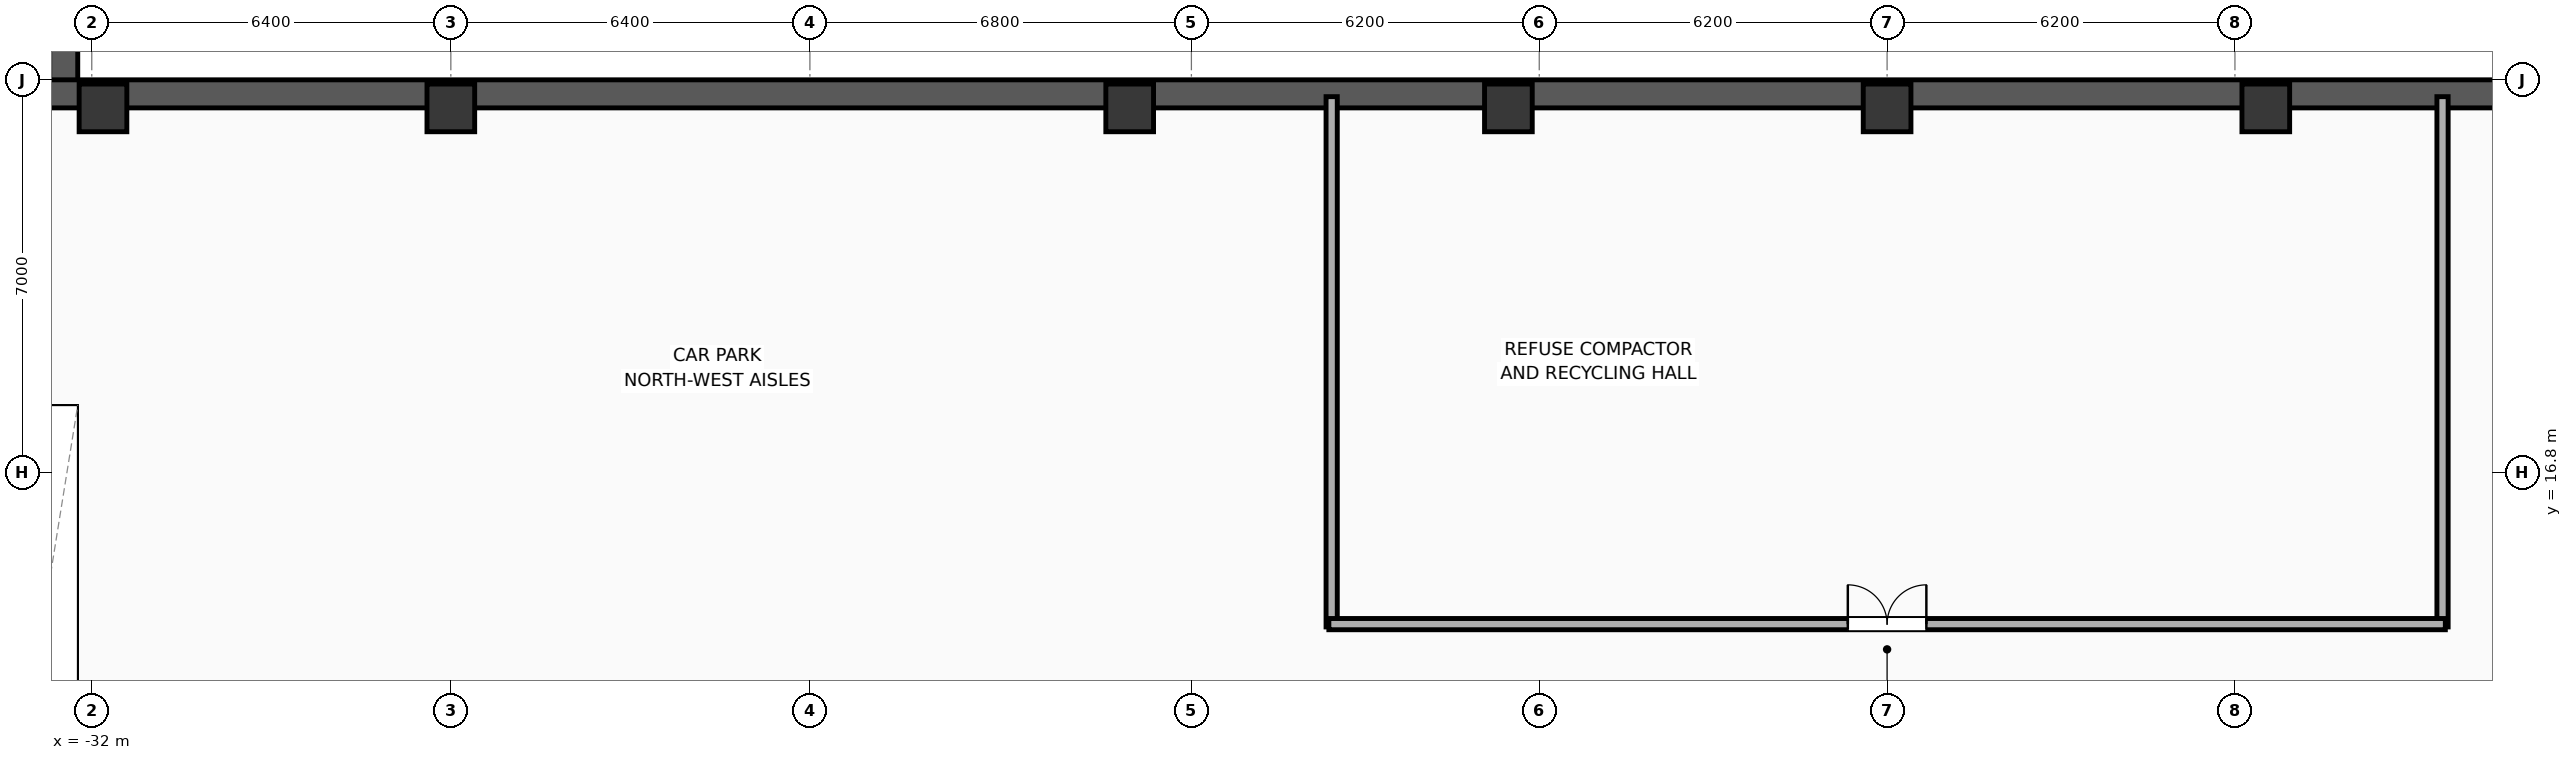
"""IFC4 building model, lengths in metres.
Left out: names, types, materials, properties, quantities, classifications, styles, units other than length and angle.
Written with IfcOpenShell. Run it as: python <this file> out.ifc"""

import sys

from ifc_helpers import new_model, si_unit, direction, frame, frame_2d, origin, origin_2d, place, context, subcontext, project, spatial, rectangle, extrude, element, fill, save


model = new_model("IFC4")
c1 = context("Model", 3, precision=1e-05, world=origin(), true_north=direction((0.0, 1.0)))
c2 = subcontext(c1, "Body", "Model", "MODEL_VIEW")
j1 = project(units=[si_unit("LENGTHUNIT", "METRE"), si_unit("PLANEANGLEUNIT", "RADIAN")], contexts=[c1])
p1 = place(None, origin())
s1 = spatial("IfcSite", under=j1, at=p1, CompositionType="ELEMENT")
p2 = place(p1, origin())
s2 = spatial("IfcBuilding", under=s1, at=p2, CompositionType="ELEMENT")
p3 = place(p2, frame((0.0, 0.0, -5.2)))
s3 = spatial("IfcBuildingStorey", under=s2, at=p3, CompositionType="ELEMENT", Elevation=-5.2)
p4 = place(p3, frame((-32.5, 23.55, 0.0), z_axis=(0.0, 0.0, 1.0), x_axis=(0.0, 1.0, 0.0)))
e1 = element("IfcWall", 1, at=p4, inside=s3, PredefinedType="USERDEFINED", context=c2, shape_type="SweptSolid", body=[
    extrude(rectangle(XDim=3.6, YDim=0.5, at=frame_2d((1.8, 0.0))), origin(), (0.0, 0.0, 1.0), 5.02),
])
p5 = place(p3, frame((-38.4, 23.55, 0.0), z_axis=(0.0, 0.0, 1.0), x_axis=(1.0, 0.0, 0.0)))
e2 = element("IfcWall", 2, at=p5, inside=s3, PredefinedType="USERDEFINED", context=c2, shape_type="SweptSolid", body=[
    extrude(rectangle(XDim=74.0, YDim=0.5, at=frame_2d((37.0, 0.0))), origin(), (0.0, 0.0, 1.0), 4.92),
])
for number, where, z_axis, x_axis in (
    (3, (-31.8, 23.3, 0.0), (0.0, 0.0, 1.0), (1.0, 0.0, 0.0)),
    (4, (-25.6, 23.3, 0.0), (0.0, 0.0, 1.0), (1.0, 0.0, 0.0)),
    (5, (-13.5, 23.3, 0.0), (0.0, 0.0, 1.0), (1.0, 0.0, 0.0)),
    (6, (-6.75, 23.3, 0.0), (0.0, 0.0, 1.0), (1.0, 0.0, 0.0)),
    (7, (0.0, 23.3, 0.0), (0.0, 0.0, 1.0), (1.0, 0.0, 0.0)),
    (8, (6.75, 23.3, 0.0), (0.0, 0.0, 1.0), (1.0, 0.0, 0.0)),
):
    element("IfcColumn", number, at=place(p3, frame(where, z_axis=z_axis, x_axis=x_axis)), inside=s3, PredefinedType="COLUMN", context=c2, shape_type="SweptSolid", body=[
        extrude(rectangle(XDim=0.85, YDim=0.85, at=origin_2d()), origin(), (0.0, 0.0, 1.0), 5.2),
    ])
for number, where, z_axis, x_axis in (
    (9, (-9.9, 14.05, 0.0), (0.0, 0.0, 1.0), (0.0, 1.0, 0.0)),
    (10, (9.9, 14.05, 0.0), (0.0, 0.0, 1.0), (0.0, 1.0, 0.0)),
):
    element("IfcWall", number, at=place(p3, frame(where, z_axis=z_axis, x_axis=x_axis)), inside=s3, PredefinedType="PARTITIONING", context=c2, shape_type="SweptSolid", body=[
        extrude(rectangle(XDim=9.45, YDim=0.2, at=frame_2d((4.725, 0.0))), origin(), (0.0, 0.0, 1.0), 4.92),
    ])
p6 = place(p3, frame((-9.95, 14.1, 0.0), z_axis=(0.0, 0.0, 1.0), x_axis=(1.0, 0.0, 0.0)))
e11 = element("IfcWall", 11, at=p6, inside=s3, PredefinedType="PARTITIONING", context=c2, shape_type="SweptSolid", body=[
    extrude(rectangle(XDim=19.9, YDim=0.2, at=frame_2d((9.95, 0.0))), origin(), (0.0, 0.0, 1.0), 4.92),
])
p7 = place(p6, frame((9.25, 0.0, 0.0)))
e12 = element("IfcOpeningElement", 12, at=p7, cuts=e11, PredefinedType="OPENING", context=c2, shape_type="SweptSolid", body=[
    extrude(rectangle(XDim=1.4, YDim=2.05, at=frame_2d((0.7, 1.025))), frame((0.0, 0.11, 0.0), z_axis=(0.0, -1.0, 0.0), x_axis=(1.0, 0.0, 0.0)), (0.0, 0.0, 1.0), 0.22),
])
p8 = place(p7, origin())
e13 = element("IfcDoor", 13, at=p8, inside=s3, OperationType="DOUBLE_DOOR_SINGLE_SWING", PredefinedType="DOOR", context=c2, shape_type="SweptSolid", body=[
    extrude(rectangle(XDim=1.4, YDim=2.05, at=frame_2d((0.7, 1.025))), frame((0.0, 0.025, 0.0), z_axis=(0.0, -1.0, 0.0), x_axis=(1.0, 0.0, 0.0)), (0.0, 0.0, 1.0), 0.05),
])
fill(e12, e13)
save(model, sys.argv[1])
